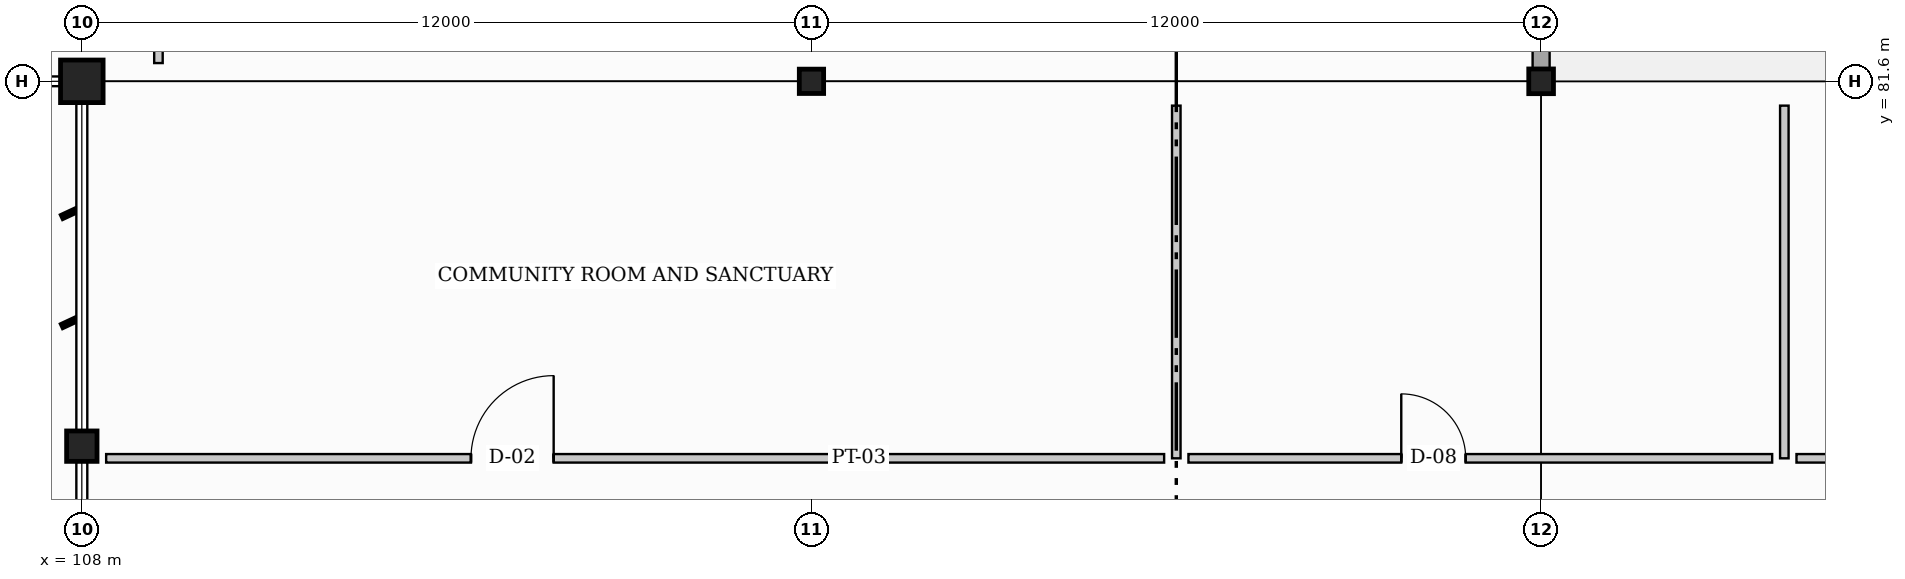
"""IFC4 building model, lengths in metres.
Left out: names, types, materials, properties, quantities, classifications, styles, units other than length and angle.
Written with IfcOpenShell. Run it as: python <this file> out.ifc"""

import sys

from ifc_helpers import new_model, si_unit, direction, frame, frame_2d, origin, origin_2d, place, context, subcontext, project, spatial, rectangle, hollow_circle, i_section, extrude, element, fill, save


model = new_model("IFC4")
c1 = context("Model", 3, precision=1e-05, world=origin(), true_north=direction((0.0, 1.0)))
c2 = subcontext(c1, "Body", "Model", "MODEL_VIEW")
j1 = project(units=[si_unit("LENGTHUNIT", "METRE"), si_unit("PLANEANGLEUNIT", "RADIAN")], contexts=[c1])
p1 = place(None, origin())
s1 = spatial("IfcSite", under=j1, at=p1, CompositionType="ELEMENT")
p2 = place(p1, origin())
s2 = spatial("IfcBuilding", under=s1, at=p2, CompositionType="ELEMENT")
p3 = place(p2, origin())
s3 = spatial("IfcBuildingStorey", under=s2, at=p3, CompositionType="ELEMENT", Elevation=0.0)
p4 = place(p3, frame((108.0, 81.6, 0.0), z_axis=(0.0, 0.0, 1.0), x_axis=(0.0, 1.0, 0.0)))
e1 = element("IfcColumn", 1, at=p4, inside=s3, PredefinedType="COLUMN", context=c2, shape_type="SweptSolid", body=[
    extrude(rectangle(XDim=0.7, YDim=0.7, at=origin_2d()), origin(), (0.0, 0.0, 1.0), 4.8),
])
p5 = place(p3, frame((120.0, 81.6, 0.0), z_axis=(0.0, 0.0, 1.0), x_axis=(1.0, 0.0, 0.0)))
e2 = element("IfcColumn", 2, at=p5, inside=s3, PredefinedType="COLUMN", context=c2, shape_type="SweptSolid", body=[
    extrude(i_section(OverallWidth=0.4, OverallDepth=0.4, WebThickness=0.02, FlangeThickness=0.028, at=origin_2d()), origin(), (0.0, 0.0, 1.0), 4.8),
])
p6 = place(p3, frame((132.0, 81.6, 0.0), z_axis=(0.0, 0.0, 1.0), x_axis=(0.0, 1.0, 0.0)))
e3 = element("IfcColumn", 3, at=p6, inside=s3, PredefinedType="COLUMN", context=c2, shape_type="SweptSolid", body=[
    extrude(hollow_circle(Radius=0.203, WallThickness=0.016, at=origin_2d()), origin(), (0.0, 0.0, 1.0), 4.8),
])
p7 = place(p3, frame((108.0, 75.6, 0.0), z_axis=(0.0, 0.0, 1.0), x_axis=(1.0, 0.0, 0.0)))
e4 = element("IfcColumn", 4, at=p7, inside=s3, PredefinedType="COLUMN", context=c2, shape_type="SweptSolid", body=[
    extrude(i_section(OverallWidth=0.5, OverallDepth=0.5, WebThickness=0.022, FlangeThickness=0.036, at=origin_2d()), origin(), (0.0, 0.0, 1.0), 4.8),
])
p8 = place(p3, frame((132.0, 93.6, 0.0), z_axis=(0.0, 0.0, 1.0), x_axis=(0.0, -1.0, 0.0)))
e5 = element("IfcWall", 5, at=p8, inside=s3, PredefinedType="STANDARD", context=c2, shape_type="SweptSolid", body=[
    extrude(rectangle(XDim=12.0, YDim=0.28, at=frame_2d((6.0, 0.0))), origin(), (0.0, 0.0, 1.0), 3.823),
])
p9 = place(p3, frame((108.4, 75.4, 0.0), z_axis=(0.0, 0.0, 1.0), x_axis=(1.0, 0.0, 0.0)))
e6 = element("IfcWall", 6, at=p9, inside=s3, PredefinedType="PARTITIONING", context=c2, shape_type="SweptSolid", body=[
    extrude(rectangle(XDim=17.4, YDim=0.14, at=frame_2d((8.7, 0.0))), origin(), (0.0, 0.0, 1.0), 4.445),
])
p10 = place(p9, frame((6.0, 0.0, 0.0)))
e7 = element("IfcOpeningElement", 7, at=p10, cuts=e6, PredefinedType="OPENING", context=c2, shape_type="SweptSolid", body=[
    extrude(rectangle(XDim=1.36, YDim=2.18, at=frame_2d((0.68, 1.09))), frame((0.0, 0.08, 0.0), z_axis=(0.0, -1.0, 0.0), x_axis=(1.0, 0.0, 0.0)), (0.0, 0.0, 1.0), 0.16),
])
p11 = place(p3, frame((126.2, 75.4, 0.0), z_axis=(0.0, 0.0, 1.0), x_axis=(1.0, 0.0, 0.0)))
e8 = element("IfcWall", 8, at=p11, inside=s3, PredefinedType="PARTITIONING", context=c2, shape_type="SweptSolid", body=[
    extrude(rectangle(XDim=9.6, YDim=0.14, at=frame_2d((4.8, 0.0))), origin(), (0.0, 0.0, 1.0), 4.445),
])
p12 = place(p11, frame((3.5, 0.0, 0.0)))
e9 = element("IfcOpeningElement", 9, at=p12, cuts=e8, PredefinedType="OPENING", context=c2, shape_type="SweptSolid", body=[
    extrude(rectangle(XDim=1.06, YDim=2.1, at=frame_2d((0.53, 1.05))), frame((0.0, 0.08, 0.0), z_axis=(0.0, -1.0, 0.0), x_axis=(1.0, 0.0, 0.0)), (0.0, 0.0, 1.0), 0.16),
])
p13 = place(p3, frame((136.2, 75.4, 0.0), z_axis=(0.0, 0.0, 1.0), x_axis=(1.0, 0.0, 0.0)))
e10 = element("IfcWall", 10, at=p13, inside=s3, PredefinedType="PARTITIONING", context=c2, shape_type="SweptSolid", body=[
    extrude(rectangle(XDim=7.4, YDim=0.14, at=frame_2d((3.7, 0.0))), origin(), (0.0, 0.0, 1.0), 4.445),
])
p14 = place(p13, frame((2.5, 0.0, 0.0)))
e11 = element("IfcOpeningElement", 11, at=p14, cuts=e10, PredefinedType="OPENING", context=c2, shape_type="SweptSolid", body=[
    extrude(rectangle(XDim=1.02, YDim=2.08, at=frame_2d((0.51, 1.04))), frame((0.0, 0.08, 0.0), z_axis=(0.0, -1.0, 0.0), x_axis=(1.0, 0.0, 0.0)), (0.0, 0.0, 1.0), 0.16),
])
for number, where, z_axis, x_axis in (
    (12, (126.0, 75.4, 0.0), (0.0, 0.0, 1.0), (0.0, 1.0, 0.0)),
    (13, (136.0, 75.4, 0.0), (0.0, 0.0, 1.0), (0.0, 1.0, 0.0)),
):
    element("IfcWall", number, at=place(p3, frame(where, z_axis=z_axis, x_axis=x_axis)), inside=s3, PredefinedType="PARTITIONING", context=c2, shape_type="SweptSolid", body=[
        extrude(rectangle(XDim=5.8, YDim=0.14, at=frame_2d((2.9, 0.0))), origin(), (0.0, 0.0, 1.0), 4.445),
    ])
p15 = place(p3, frame((109.26, 81.9, 0.0), z_axis=(0.0, 0.0, 1.0), x_axis=(0.0, 1.0, 0.0)))
e14 = element("IfcWall", 14, at=p15, inside=s3, PredefinedType="PARTITIONING", context=c2, shape_type="SweptSolid", body=[
    extrude(rectangle(XDim=17.5, YDim=0.14, at=frame_2d((8.75, 0.0))), origin(), (0.0, 0.0, 1.0), 3.818),
])
p16 = place(p10, origin())
e15 = element("IfcDoor", 15, at=p16, inside=s3, OperationType="SINGLE_SWING_RIGHT", PredefinedType="DOOR", context=c2, shape_type="SweptSolid", body=[
    extrude(rectangle(XDim=1.36, YDim=2.18, at=frame_2d((0.68, 1.09))), frame((0.0, 0.025, 0.0), z_axis=(0.0, -1.0, 0.0), x_axis=(1.0, 0.0, 0.0)), (0.0, 0.0, 1.0), 0.05),
])
fill(e7, e15)
p17 = place(p12, origin())
e16 = element("IfcDoor", 16, at=p17, inside=s3, OperationType="SINGLE_SWING_LEFT", PredefinedType="DOOR", context=c2, shape_type="SweptSolid", body=[
    extrude(rectangle(XDim=1.06, YDim=2.1, at=frame_2d((0.53, 1.05))), frame((0.0, 0.025, 0.0), z_axis=(0.0, -1.0, 0.0), x_axis=(1.0, 0.0, 0.0)), (0.0, 0.0, 1.0), 0.05),
])
fill(e9, e16)
save(model, sys.argv[1])
